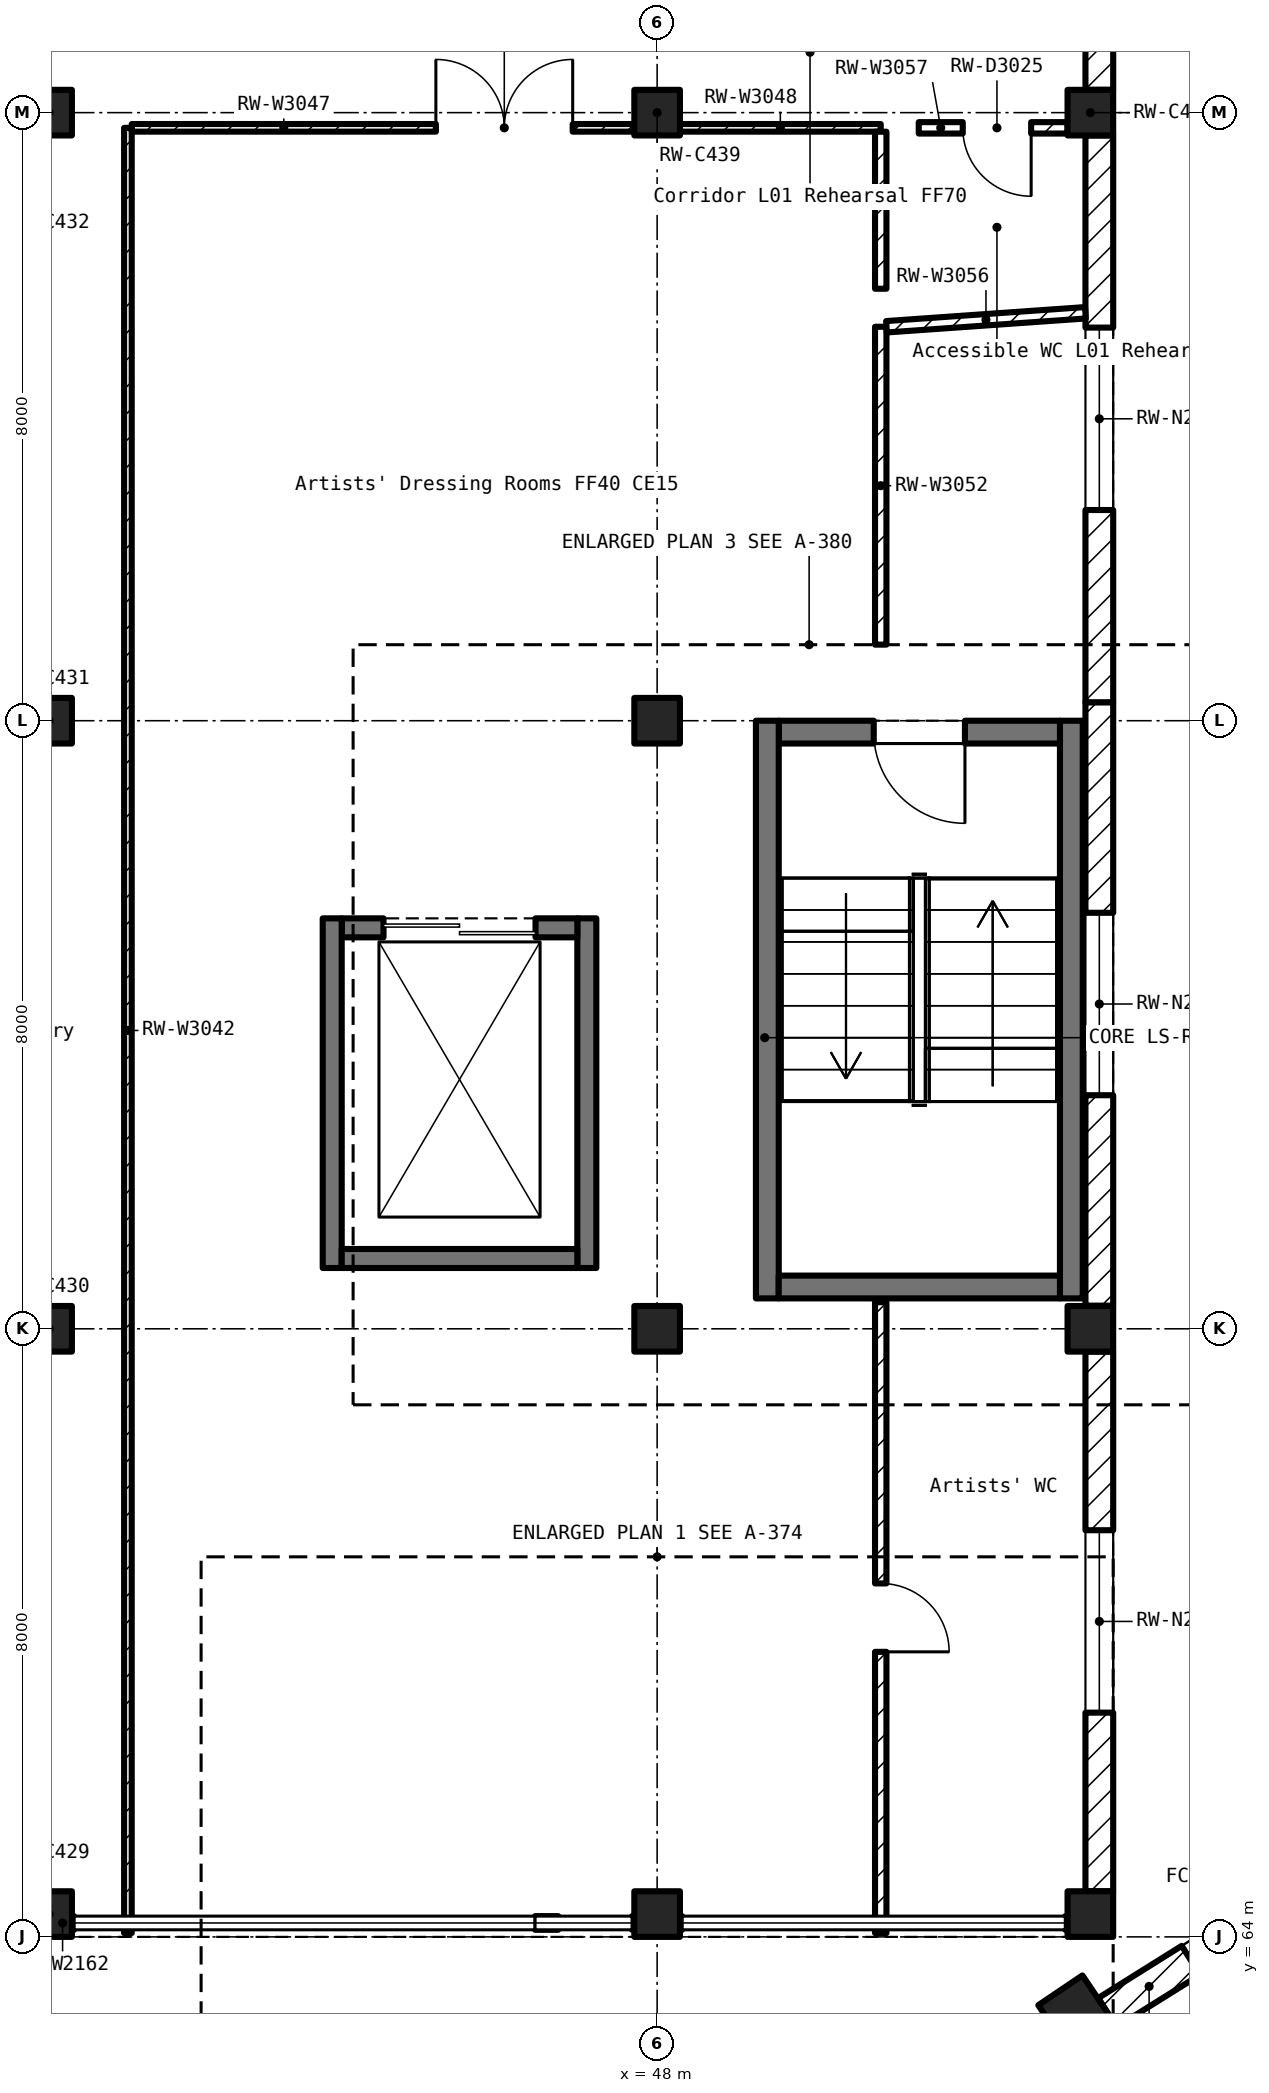
"""IFC4 building model, lengths in metres.
Left out: names, types, materials, properties, quantities, classifications, styles, units other than length and angle.
Written with IfcOpenShell. Run it as: python <this file> out.ifc"""

import sys

from ifc_helpers import new_model, si_unit, direction, frame, frame_2d, origin, origin_2d, place, context, subcontext, project, spatial, rectangle, i_section, extrude, element, fill, save


model = new_model("IFC4")
c1 = context("Model", 3, precision=1e-05, world=origin(), true_north=direction((0.0, 1.0)))
c2 = subcontext(c1, "Body", "Model", "MODEL_VIEW")
j1 = project(units=[si_unit("LENGTHUNIT", "METRE"), si_unit("PLANEANGLEUNIT", "RADIAN")], contexts=[c1])
p1 = place(None, origin())
s1 = spatial("IfcSite", under=j1, at=p1, CompositionType="ELEMENT")
p2 = place(p1, origin())
s2 = spatial("IfcBuilding", under=s1, at=p2, CompositionType="ELEMENT")
p3 = place(p2, frame((0.0, 0.0, 6.0)))
s3 = spatial("IfcBuildingStorey", under=s2, at=p3, CompositionType="ELEMENT", Elevation=6.0)
p4 = place(p3, frame((53.501, 63.007, 0.0), z_axis=(0.0, 0.0, 1.0), x_axis=(0.829037572555, 0.559192903471, 0.0)))
e1 = element("IfcColumn", 1, at=p4, inside=s3, PredefinedType="COLUMN", context=c2, shape_type="SweptSolid", body=[
    extrude(rectangle(XDim=0.7, YDim=0.7, at=origin_2d()), origin(), (0.0, 0.0, 1.0), 5.5),
])
for number, where, z_axis, x_axis in (
    (2, (40.0, 64.3, 0.0), (0.0, 0.0, 1.0), (1.0, 0.0, 0.0)),
    (3, (40.0, 72.0, 0.0), (0.0, 0.0, 1.0), (1.0, 0.0, 0.0)),
    (4, (40.0, 80.0, 0.0), (0.0, 0.0, 1.0), (1.0, 0.0, 0.0)),
    (5, (40.0, 88.0, 0.0), (0.0, 0.0, 1.0), (1.0, 0.0, 0.0)),
    (6, (48.0, 64.3, 0.0), (0.0, 0.0, 1.0), (1.0, 0.0, 0.0)),
    (7, (48.0, 72.0, 0.0), (0.0, 0.0, 1.0), (1.0, 0.0, 0.0)),
    (8, (48.0, 80.0, 0.0), (0.0, 0.0, 1.0), (1.0, 0.0, 0.0)),
    (9, (48.0, 88.0, 0.0), (0.0, 0.0, 1.0), (1.0, 0.0, 0.0)),
    (10, (53.7, 64.3, 0.0), (0.0, 0.0, 1.0), (1.0, 0.0, 0.0)),
    (11, (53.7, 72.0, 0.0), (0.0, 0.0, 1.0), (1.0, 0.0, 0.0)),
    (12, (53.7, 88.0, 0.0), (0.0, 0.0, 1.0), (1.0, 0.0, 0.0)),
):
    element("IfcColumn", number, at=place(p3, frame(where, z_axis=z_axis, x_axis=x_axis)), inside=s3, PredefinedType="COLUMN", context=c2, shape_type="SweptSolid", body=[
        extrude(rectangle(XDim=0.6, YDim=0.6, at=origin_2d()), origin(), (0.0, 0.0, 1.0), 5.5),
    ])
p5 = place(p2, origin())
s4 = spatial("IfcBuildingStorey", under=s2, at=p5, CompositionType="ELEMENT", Elevation=0.0)
p6 = place(p5, frame((54.2, 72.4, -0.98), z_axis=(0.0, 0.0, 1.0), x_axis=(1.0, 0.0, 0.0)))
e13 = element("IfcColumn", 13, at=p6, inside=s4, PredefinedType="COLUMN", context=c2, shape_type="SweptSolid", body=[
    extrude(i_section(OverallWidth=0.24, OverallDepth=0.23, WebThickness=0.008, FlangeThickness=0.012, FilletRadius=0.021, at=origin_2d()), origin(), (0.0, 0.0, 1.0), 9.13),
])
p7 = place(p3, frame((53.924, 63.005, 0.0), z_axis=(0.0, 0.0, 1.0), x_axis=(0.847929565971, 0.530108904992, 0.0)))
e14 = element("IfcWall", 14, at=p7, inside=s3, PredefinedType="SOLIDWALL", context=c2, shape_type="SweptSolid", body=[
    extrude(rectangle(XDim=4.59, YDim=0.45, at=frame_2d((2.295, 0.0))), origin(), (0.0, 0.0, 1.0), 4.48),
])
p8 = place(p7, frame((1.295, 0.0, 1.0)))
e15 = element("IfcOpeningElement", 15, at=p8, cuts=e14, PredefinedType="OPENING", context=c2, shape_type="SweptSolid", body=[
    extrude(rectangle(XDim=2.0, YDim=2.8, at=frame_2d((1.0, 1.4))), frame((0.0, 0.237, 0.0), z_axis=(0.0, -1.0, 0.0), x_axis=(1.0, 0.0, 0.0)), (0.0, 0.0, 1.0), 0.474),
])
p9 = place(p3, frame((53.818, 64.6, 0.0), z_axis=(0.0, 0.0, 1.0), x_axis=(0.0, 1.0, 0.0)))
e16 = element("IfcWall", 16, at=p9, inside=s3, PredefinedType="SOLIDWALL", context=c2, shape_type="SweptSolid", body=[
    extrude(rectangle(XDim=7.1, YDim=0.365, at=frame_2d((3.55, 0.0))), origin(), (0.0, 0.0, 1.0), 4.55),
])
p10 = place(p9, frame((2.35, 0.0, 1.0)))
e17 = element("IfcOpeningElement", 17, at=p10, cuts=e16, PredefinedType="OPENING", context=c2, shape_type="SweptSolid", body=[
    extrude(rectangle(XDim=2.4, YDim=2.0, at=frame_2d((1.2, 1.0))), frame((0.0, 0.195, 0.0), z_axis=(0.0, -1.0, 0.0), x_axis=(1.0, 0.0, 0.0)), (0.0, 0.0, 1.0), 0.389),
])
p11 = place(p3, frame((53.818, 72.304, 0.0), z_axis=(0.0, 0.0, 1.0), x_axis=(0.0, 1.0, 0.0)))
e18 = element("IfcWall", 18, at=p11, inside=s3, PredefinedType="SOLIDWALL", context=c2, shape_type="SweptSolid", body=[
    extrude(rectangle(XDim=7.939, YDim=0.365, at=frame_2d((3.969, 0.0))), origin(), (0.0, 0.0, 1.0), 4.55),
])
p12 = place(p11, frame((2.769, 0.0, 1.0)))
e19 = element("IfcOpeningElement", 19, at=p12, cuts=e18, PredefinedType="OPENING", context=c2, shape_type="SweptSolid", body=[
    extrude(rectangle(XDim=2.4, YDim=2.0, at=frame_2d((1.2, 1.0))), frame((0.0, 0.195, 0.0), z_axis=(0.0, -1.0, 0.0), x_axis=(1.0, 0.0, 0.0)), (0.0, 0.0, 1.0), 0.389),
])
p13 = place(p3, frame((53.818, 80.243, 0.0), z_axis=(0.0, 0.0, 1.0), x_axis=(0.0, 1.0, 0.0)))
e20 = element("IfcWall", 20, at=p13, inside=s3, PredefinedType="SOLIDWALL", context=c2, shape_type="SweptSolid", body=[
    extrude(rectangle(XDim=7.457, YDim=0.365, at=frame_2d((3.729, 0.0))), origin(), (0.0, 0.0, 1.0), 4.55),
])
p14 = place(p13, frame((2.529, 0.0, 1.0)))
e21 = element("IfcOpeningElement", 21, at=p14, cuts=e20, PredefinedType="OPENING", context=c2, shape_type="SweptSolid", body=[
    extrude(rectangle(XDim=2.4, YDim=2.0, at=frame_2d((1.2, 1.0))), frame((0.0, 0.195, 0.0), z_axis=(0.0, -1.0, 0.0), x_axis=(1.0, 0.0, 0.0)), (0.0, 0.0, 1.0), 0.389),
])
p15 = place(p3, frame((53.818, 88.3, 0.0), z_axis=(0.0, 0.0, 1.0), x_axis=(0.0, 1.0, 0.0)))
e22 = element("IfcWall", 22, at=p15, inside=s3, PredefinedType="SOLIDWALL", context=c2, shape_type="SweptSolid", body=[
    extrude(rectangle(XDim=7.4, YDim=0.365, at=frame_2d((3.7, 0.0))), origin(), (0.0, 0.0, 1.0), 4.55),
])
p16 = place(p15, frame((2.5, 0.0, 1.0)))
e23 = element("IfcOpeningElement", 23, at=p16, cuts=e22, PredefinedType="OPENING", context=c2, shape_type="SweptSolid", body=[
    extrude(rectangle(XDim=2.4, YDim=2.0, at=frame_2d((1.2, 1.0))), frame((0.0, 0.195, 0.0), z_axis=(0.0, -1.0, 0.0), x_axis=(1.0, 0.0, 0.0)), (0.0, 0.0, 1.0), 0.389),
])
p17 = place(p3, frame((53.45, 72.4, 0.0), z_axis=(0.0, 0.0, 1.0), x_axis=(0.0, 1.0, 0.0)))
e24 = element("IfcWall", 24, at=p17, inside=s3, PredefinedType="SOLIDWALL", context=c2, shape_type="SweptSolid", body=[
    extrude(rectangle(XDim=7.6, YDim=0.3, at=frame_2d((3.8, 0.0))), origin(), (0.0, 0.0, 1.0), 5.5),
])
p18 = place(p3, frame((53.3, 79.85, 0.0), z_axis=(0.0, 0.0, 1.0), x_axis=(-1.0, 0.0, 0.0)))
e25 = element("IfcWall", 25, at=p18, inside=s3, PredefinedType="SOLIDWALL", context=c2, shape_type="SweptSolid", body=[
    extrude(rectangle(XDim=3.7, YDim=0.3, at=frame_2d((1.85, 0.0))), origin(), (0.0, 0.0, 1.0), 5.5),
])
p19 = place(p18, frame((1.25, 0.0, 0.0)))
e26 = element("IfcOpeningElement", 26, at=p19, cuts=e25, PredefinedType="OPENING", context=c2, shape_type="SweptSolid", body=[
    extrude(rectangle(XDim=1.2, YDim=2.1, at=frame_2d((0.6, 1.05))), frame((0.0, 0.162, 0.0), z_axis=(0.0, -1.0, 0.0), x_axis=(1.0, 0.0, 0.0)), (0.0, 0.0, 1.0), 0.324),
])
p20 = place(p3, frame((49.45, 80.0, 0.0), z_axis=(0.0, 0.0, 1.0), x_axis=(0.0, -1.0, 0.0)))
e27 = element("IfcWall", 27, at=p20, inside=s3, PredefinedType="SOLIDWALL", context=c2, shape_type="SweptSolid", body=[
    extrude(rectangle(XDim=7.6, YDim=0.3, at=frame_2d((3.8, 0.0))), origin(), (0.0, 0.0, 1.0), 5.5),
])
p21 = place(p3, frame((49.6, 72.55, 0.0), z_axis=(0.0, 0.0, 1.0), x_axis=(1.0, 0.0, 0.0)))
e28 = element("IfcWall", 28, at=p21, inside=s3, PredefinedType="SOLIDWALL", context=c2, shape_type="SweptSolid", body=[
    extrude(rectangle(XDim=3.7, YDim=0.3, at=frame_2d((1.85, 0.0))), origin(), (0.0, 0.0, 1.0), 5.5),
])
p22 = place(p3, frame((59.019, 65.542, 0.0), z_axis=(0.0, 0.0, 1.0), x_axis=(-0.819160804606, -0.573563925118, 0.0)))
e29 = element("IfcWall", 29, at=p22, inside=s3, PredefinedType="SOLIDWALL", context=c2, shape_type="SweptSolid", body=[
    extrude(rectangle(XDim=5.0, YDim=0.3, at=frame_2d((2.5, 0.0))), origin(), (0.0, 0.0, 1.0), 5.5),
])
p23 = place(p3, frame((47.075, 72.8, 0.0), z_axis=(0.0, 0.0, 1.0), x_axis=(0.0, 1.0, 0.0)))
e30 = element("IfcWall", 30, at=p23, inside=s3, PredefinedType="SOLIDWALL", context=c2, shape_type="SweptSolid", body=[
    extrude(rectangle(XDim=4.6, YDim=0.25, at=frame_2d((2.3, 0.0))), origin(), (0.0, 0.0, 1.0), 5.5),
])
p24 = place(p3, frame((46.95, 77.275, 0.0), z_axis=(0.0, 0.0, 1.0), x_axis=(-1.0, 0.0, 0.0)))
e31 = element("IfcWall", 31, at=p24, inside=s3, PredefinedType="SOLIDWALL", context=c2, shape_type="SweptSolid", body=[
    extrude(rectangle(XDim=3.1, YDim=0.25, at=frame_2d((1.55, 0.0))), origin(), (0.0, 0.0, 1.0), 5.5),
])
p25 = place(p24, frame((0.55, 0.0, 0.0)))
e32 = element("IfcOpeningElement", 32, at=p25, cuts=e31, PredefinedType="OPENING", context=c2, shape_type="SweptSolid", body=[
    extrude(rectangle(XDim=2.0, YDim=2.2, at=frame_2d((1.0, 1.1))), frame((0.0, 0.137, 0.0), z_axis=(0.0, -1.0, 0.0), x_axis=(1.0, 0.0, 0.0)), (0.0, 0.0, 1.0), 0.274),
])
p26 = place(p3, frame((43.725, 77.4, 0.0), z_axis=(0.0, 0.0, 1.0), x_axis=(0.0, -1.0, 0.0)))
e33 = element("IfcWall", 33, at=p26, inside=s3, PredefinedType="SOLIDWALL", context=c2, shape_type="SweptSolid", body=[
    extrude(rectangle(XDim=4.6, YDim=0.25, at=frame_2d((2.3, 0.0))), origin(), (0.0, 0.0, 1.0), 5.5),
])
p27 = place(p3, frame((43.85, 72.925, 0.0), z_axis=(0.0, 0.0, 1.0), x_axis=(1.0, 0.0, 0.0)))
e34 = element("IfcWall", 34, at=p27, inside=s3, PredefinedType="SOLIDWALL", context=c2, shape_type="SweptSolid", body=[
    extrude(rectangle(XDim=3.1, YDim=0.25, at=frame_2d((1.55, 0.0))), origin(), (0.0, 0.0, 1.0), 5.5),
])
p28 = place(p3, frame((41.037, 64.05, 0.0), z_axis=(0.0, 0.0, 1.0), x_axis=(0.0, 1.0, 0.0)))
e35 = element("IfcWall", 35, at=p28, inside=s3, PredefinedType="PARTITIONING", context=c2, shape_type="SweptSolid", body=[
    extrude(rectangle(XDim=23.75, YDim=0.1, at=frame_2d((11.875, 0.0))), origin(), (0.0, 0.0, 1.0), 4.45),
])
p29 = place(p3, frame((41.087, 87.8, 0.0), z_axis=(0.0, 0.0, 1.0), x_axis=(1.0, 0.0, 0.0)))
e36 = element("IfcWall", 36, at=p29, inside=s3, PredefinedType="PARTITIONING", context=c2, shape_type="SweptSolid", body=[
    extrude(rectangle(XDim=6.613, YDim=0.1, at=frame_2d((3.307, 0.0))), origin(), (0.0, 0.0, 1.0), 4.45),
])
p30 = place(p29, frame((4.002, 0.0, 0.0)))
e37 = element("IfcOpeningElement", 37, at=p30, cuts=e36, PredefinedType="OPENING", context=c2, shape_type="SweptSolid", body=[
    extrude(rectangle(XDim=1.8, YDim=2.1, at=frame_2d((0.9, 1.05))), frame((0.0, 0.062, 0.0), z_axis=(0.0, -1.0, 0.0), x_axis=(1.0, 0.0, 0.0)), (0.0, 0.0, 1.0), 0.124),
])
p31 = place(p3, frame((48.3, 87.8, 0.0), z_axis=(0.0, 0.0, 1.0), x_axis=(1.0, 0.0, 0.0)))
e38 = element("IfcWall", 38, at=p31, inside=s3, PredefinedType="PARTITIONING", context=c2, shape_type="SweptSolid", body=[
    extrude(rectangle(XDim=2.642, YDim=0.1, at=frame_2d((1.321, 0.0))), origin(), (0.0, 0.0, 1.0), 4.45),
])
p32 = place(p3, frame((50.942, 72.35, 0.0), z_axis=(0.0, 0.0, 1.0), x_axis=(0.0, -1.0, 0.0)))
e39 = element("IfcWall", 39, at=p32, inside=s3, PredefinedType="PARTITIONING", context=c2, shape_type="SweptSolid", body=[
    extrude(rectangle(XDim=8.3, YDim=0.15, at=frame_2d((4.15, 0.0))), origin(), (0.0, 0.0, 1.0), 4.45),
])
p33 = place(p32, frame((3.7, 0.0, 0.0)))
e40 = element("IfcOpeningElement", 40, at=p33, cuts=e39, PredefinedType="OPENING", context=c2, shape_type="SweptSolid", body=[
    extrude(rectangle(XDim=0.9, YDim=2.1, at=frame_2d((0.45, 1.05))), frame((0.0, 0.087, 0.0), z_axis=(0.0, -1.0, 0.0), x_axis=(1.0, 0.0, 0.0)), (0.0, 0.0, 1.0), 0.174),
])
p34 = place(p3, frame((50.942, 85.183, 0.0), z_axis=(0.0, 0.0, 1.0), x_axis=(0.0, -1.0, 0.0)))
e41 = element("IfcWall", 41, at=p34, inside=s3, PredefinedType="PARTITIONING", context=c2, shape_type="SweptSolid", body=[
    extrude(rectangle(XDim=4.182, YDim=0.15, at=frame_2d((2.091, 0.0))), origin(), (0.0, 0.0, 1.0), 4.45),
])
p35 = place(p3, frame((53.635, 85.367, 0.0), z_axis=(0.0, 0.0, 1.0), x_axis=(-0.997541627846, -0.070076391993, 0.0)))
e42 = element("IfcWall", 42, at=p35, inside=s3, PredefinedType="PARTITIONING", context=c2, shape_type="SweptSolid", body=[
    extrude(rectangle(XDim=2.623, YDim=0.15, at=frame_2d((1.312, 0.0))), origin(), (0.0, 0.0, 1.0), 4.45),
])
p36 = place(p3, frame((53.4, 87.8, 0.0), z_axis=(0.0, 0.0, 1.0), x_axis=(-1.0, 0.0, 0.0)))
e43 = element("IfcWall", 43, at=p36, inside=s3, PredefinedType="PARTITIONING", context=c2, shape_type="SweptSolid", body=[
    extrude(rectangle(XDim=1.958, YDim=0.15, at=frame_2d((0.979, 0.0))), origin(), (0.0, 0.0, 1.0), 4.45),
])
p37 = place(p36, frame((0.479, 0.0, 0.0)))
e44 = element("IfcOpeningElement", 44, at=p37, cuts=e43, PredefinedType="OPENING", context=c2, shape_type="SweptSolid", body=[
    extrude(rectangle(XDim=0.9, YDim=2.1, at=frame_2d((0.45, 1.05))), frame((0.0, 0.087, 0.0), z_axis=(0.0, -1.0, 0.0), x_axis=(1.0, 0.0, 0.0)), (0.0, 0.0, 1.0), 0.174),
])
p38 = place(p3, frame((50.942, 87.749, 0.0), z_axis=(0.0, 0.0, 1.0), x_axis=(0.0, -1.0, 0.0)))
e45 = element("IfcWall", 45, at=p38, inside=s3, PredefinedType="PARTITIONING", context=c2, shape_type="SweptSolid", body=[
    extrude(rectangle(XDim=2.066, YDim=0.15, at=frame_2d((1.033, 0.0))), origin(), (0.0, 0.0, 1.0), 4.45),
])
p39 = place(p3, frame((46.394, 64.183, 0.0), z_axis=(0.0, 0.0, 1.0), x_axis=(1.0, 0.0, 0.0)))
e46 = element("IfcWall", 46, at=p39, inside=s3, PredefinedType="SOLIDWALL", context=c2, shape_type="SweptSolid", body=[
    extrude(rectangle(XDim=0.305, YDim=0.18, at=frame_2d((0.152, 0.0))), origin(), (0.0, 0.0, 1.0), 3.7),
])
for number, where, z_axis, x_axis in (
    (47, (40.33, 64.183, 0.0), (0.0, 0.0, 1.0), (-1.0, 0.0, 0.0)),
    (48, (47.67, 64.183, 0.0), (0.0, 0.0, 1.0), (1.0, 0.0, 0.0)),
):
    element("IfcWall", number, at=place(p3, frame(where, z_axis=z_axis, x_axis=x_axis)), inside=s3, PredefinedType="SOLIDWALL", context=c2, shape_type="SweptSolid", body=[
        extrude(rectangle(XDim=0.305, YDim=0.18, at=frame_2d((0.153, 0.0))), origin(), (0.0, 0.0, 1.0), 3.7),
    ])
p40 = place(p3, frame((53.37, 64.183, 0.0), z_axis=(0.0, 0.0, 1.0), x_axis=(1.0, 0.0, 0.0)))
e49 = element("IfcWall", 49, at=p40, inside=s3, PredefinedType="SOLIDWALL", context=c2, shape_type="SweptSolid", body=[
    extrude(rectangle(XDim=0.305, YDim=0.18, at=frame_2d((0.152, 0.0))), origin(), (0.0, 0.0, 1.0), 3.7),
])
p41 = place(p3, frame((48.33, 64.183, 0.0), z_axis=(0.0, 0.0, 1.0), x_axis=(-1.0, 0.0, 0.0)))
e50 = element("IfcWall", 50, at=p41, inside=s3, PredefinedType="SOLIDWALL", context=c2, shape_type="SweptSolid", body=[
    extrude(rectangle(XDim=0.305, YDim=0.18, at=frame_2d((0.153, 0.0))), origin(), (0.0, 0.0, 1.0), 3.7),
])
p42 = place(p10, origin())
e51 = element("IfcWindow", 51, at=p42, inside=s3, PartitioningType="DOUBLE_PANEL_VERTICAL", PredefinedType="WINDOW", context=c2, shape_type="SweptSolid", body=[
    extrude(rectangle(XDim=2.4, YDim=2.0, at=frame_2d((1.2, 1.0))), frame((0.0, 0.03, 0.0), z_axis=(0.0, -1.0, 0.0), x_axis=(1.0, 0.0, 0.0)), (0.0, 0.0, 1.0), 0.06),
])
fill(e17, e51)
p43 = place(p12, origin())
e52 = element("IfcWindow", 52, at=p43, inside=s3, PartitioningType="DOUBLE_PANEL_VERTICAL", PredefinedType="WINDOW", context=c2, shape_type="SweptSolid", body=[
    extrude(rectangle(XDim=2.4, YDim=2.0, at=frame_2d((1.2, 1.0))), frame((0.0, 0.03, 0.0), z_axis=(0.0, -1.0, 0.0), x_axis=(1.0, 0.0, 0.0)), (0.0, 0.0, 1.0), 0.06),
])
fill(e19, e52)
p44 = place(p14, origin())
e53 = element("IfcWindow", 53, at=p44, inside=s3, PartitioningType="DOUBLE_PANEL_VERTICAL", PredefinedType="WINDOW", context=c2, shape_type="SweptSolid", body=[
    extrude(rectangle(XDim=2.4, YDim=2.0, at=frame_2d((1.2, 1.0))), frame((0.0, 0.03, 0.0), z_axis=(0.0, -1.0, 0.0), x_axis=(1.0, 0.0, 0.0)), (0.0, 0.0, 1.0), 0.06),
])
fill(e21, e53)
p45 = place(p19, origin())
e54 = element("IfcDoor", 54, at=p45, inside=s3, OperationType="SINGLE_SWING_LEFT", PredefinedType="DOOR", context=c2, shape_type="SweptSolid", body=[
    extrude(rectangle(XDim=1.2, YDim=2.1, at=frame_2d((0.6, 1.05))), frame((0.0, 0.025, 0.0), z_axis=(0.0, -1.0, 0.0), x_axis=(1.0, 0.0, 0.0)), (0.0, 0.0, 1.0), 0.05),
])
fill(e26, e54)
p46 = place(p25, origin())
e55 = element("IfcDoor", 55, at=p46, inside=s3, OperationType="DOUBLE_DOOR_SLIDING", PredefinedType="DOOR", context=c2, shape_type="SweptSolid", body=[
    extrude(rectangle(XDim=2.0, YDim=2.2, at=frame_2d((1.0, 1.1))), frame((0.0, 0.025, 0.0), z_axis=(0.0, -1.0, 0.0), x_axis=(1.0, 0.0, 0.0)), (0.0, 0.0, 1.0), 0.05),
])
fill(e32, e55)
p47 = place(p30, origin())
e56 = element("IfcDoor", 56, at=p47, inside=s3, OperationType="DOUBLE_DOOR_SINGLE_SWING", PredefinedType="DOOR", context=c2, shape_type="SweptSolid", body=[
    extrude(rectangle(XDim=1.8, YDim=2.1, at=frame_2d((0.9, 1.05))), frame((0.0, 0.025, 0.0), z_axis=(0.0, -1.0, 0.0), x_axis=(1.0, 0.0, 0.0)), (0.0, 0.0, 1.0), 0.05),
])
fill(e37, e56)
p48 = place(p33, origin())
e57 = element("IfcDoor", 57, at=p48, inside=s3, OperationType="SINGLE_SWING_RIGHT", PredefinedType="DOOR", context=c2, shape_type="SweptSolid", body=[
    extrude(rectangle(XDim=0.9, YDim=2.1, at=frame_2d((0.45, 1.05))), frame((0.0, 0.025, 0.0), z_axis=(0.0, -1.0, 0.0), x_axis=(1.0, 0.0, 0.0)), (0.0, 0.0, 1.0), 0.05),
])
fill(e40, e57)
p49 = place(p37, origin())
e58 = element("IfcDoor", 58, at=p49, inside=s3, OperationType="SINGLE_SWING_LEFT", PredefinedType="DOOR", context=c2, shape_type="SweptSolid", body=[
    extrude(rectangle(XDim=0.9, YDim=2.1, at=frame_2d((0.45, 1.05))), frame((0.0, 0.025, 0.0), z_axis=(0.0, -1.0, 0.0), x_axis=(1.0, 0.0, 0.0)), (0.0, 0.0, 1.0), 0.05),
])
fill(e44, e58)
save(model, sys.argv[1])
